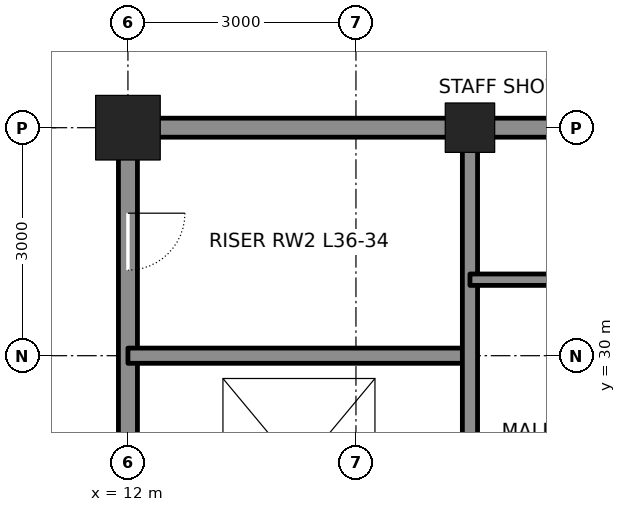
"""IFC4 building model, lengths in metres.
Left out: names, types, materials, properties, quantities, classifications, styles, units other than length and angle.
Written with IfcOpenShell. Run it as: python <this file> out.ifc"""

import sys

from ifc_helpers import new_model, si_unit, direction, frame, frame_2d, origin, origin_2d, place, context, subcontext, project, spatial, rectangle, hollow_rectangle, extrude, element, fill, save


model = new_model("IFC4")
c1 = context("Model", 3, precision=1e-05, world=origin(), true_north=direction((0.0, 1.0)))
c2 = subcontext(c1, "Body", "Model", "MODEL_VIEW")
j1 = project(units=[si_unit("LENGTHUNIT", "METRE"), si_unit("PLANEANGLEUNIT", "RADIAN")], contexts=[c1])
p1 = place(None, origin())
s1 = spatial("IfcSite", under=j1, at=p1, CompositionType="ELEMENT")
p2 = place(p1, origin())
s2 = spatial("IfcBuilding", under=s1, at=p2, CompositionType="ELEMENT")
p3 = place(p2, frame((0.0, 0.0, 165.6)))
s3 = spatial("IfcBuildingStorey", under=s2, at=p3, CompositionType="ELEMENT", Elevation=165.6)
p4 = place(p3, frame((12.0, 33.0, 0.0), z_axis=(0.0, 0.0, 1.0), x_axis=(1.0, 0.0, 0.0)))
e1 = element("IfcColumn", 1, at=p4, inside=s3, PredefinedType="COLUMN", context=c2, shape_type="SweptSolid", body=[
    extrude(hollow_rectangle(XDim=0.85, YDim=0.85, WallThickness=0.085, at=origin_2d()), origin(), (0.0, 0.0, 1.0), 4.2),
])
p5 = place(p3, frame((16.5, 33.0, 0.0), z_axis=(0.0, 0.0, 1.0), x_axis=(1.0, 0.0, 0.0)))
e2 = element("IfcColumn", 2, at=p5, inside=s3, PredefinedType="COLUMN", context=c2, shape_type="SweptSolid", body=[
    extrude(hollow_rectangle(XDim=0.65, YDim=0.65, WallThickness=0.065, at=origin_2d()), origin(), (0.0, 0.0, 1.0), 4.2),
])
p6 = place(p3, frame((12.0, 24.25, 0.0), z_axis=(0.0, 0.0, 1.0), x_axis=(0.0, 1.0, 0.0)))
e3 = element("IfcWall", 3, at=p6, inside=s3, PredefinedType="SOLIDWALL", context=c2, shape_type="SweptSolid", body=[
    extrude(rectangle(XDim=8.5, YDim=0.25, at=frame_2d((4.25, 0.0))), origin(), (0.0, 0.0, 1.0), 3.113),
])
p7 = place(p6, frame((0.65, 0.0, 0.0)))
e4 = element("IfcOpeningElement", 4, at=p7, cuts=e3, PredefinedType="OPENING", context=c2, shape_type="SweptSolid", body=[
    extrude(rectangle(XDim=1.2, YDim=2.1, at=frame_2d((0.6, 1.05))), frame((0.0, 0.135, 0.0), z_axis=(0.0, -1.0, 0.0), x_axis=(1.0, 0.0, 0.0)), (0.0, 0.0, 1.0), 0.27),
])
p8 = place(p6, frame((6.875, 0.0, 0.0)))
e5 = element("IfcOpeningElement", 5, at=p8, cuts=e3, PredefinedType="OPENING", context=c2, shape_type="SweptSolid", body=[
    extrude(rectangle(XDim=0.75, YDim=2.1, at=frame_2d((0.375, 1.05))), frame((0.0, 0.135, 0.0), z_axis=(0.0, -1.0, 0.0), x_axis=(1.0, 0.0, 0.0)), (0.0, 0.0, 1.0), 0.27),
])
p9 = place(p3, frame((12.0, 30.0, 0.0), z_axis=(0.0, 0.0, 1.0), x_axis=(1.0, 0.0, 0.0)))
e6 = element("IfcWall", 6, at=p9, inside=s3, PredefinedType="SOLIDWALL", context=c2, shape_type="SweptSolid", body=[
    extrude(rectangle(XDim=4.5, YDim=0.2, at=frame_2d((2.25, 0.0))), origin(), (0.0, 0.0, 1.0), 4.04),
])
p10 = place(p3, frame((12.25, 33.0, 0.0), z_axis=(0.0, 0.0, 1.0), x_axis=(1.0, 0.0, 0.0)))
e7 = element("IfcWall", 7, at=p10, inside=s3, PredefinedType="SOLIDWALL", context=c2, shape_type="SweptSolid", body=[
    extrude(rectangle(XDim=4.0, YDim=0.25, at=frame_2d((2.0, 0.0))), origin(), (0.0, 0.0, 1.0), 3.181),
])
p11 = place(p3, frame((16.75, 33.0, 0.0), z_axis=(0.0, 0.0, 1.0), x_axis=(1.0, 0.0, 0.0)))
e8 = element("IfcWall", 8, at=p11, inside=s3, PredefinedType="SOLIDWALL", context=c2, shape_type="SweptSolid", body=[
    extrude(rectangle(XDim=2.5, YDim=0.25, at=frame_2d((1.25, 0.0))), origin(), (0.0, 0.0, 1.0), 3.181),
])
p12 = place(p3, frame((16.5, 24.25, 0.0), z_axis=(0.0, 0.0, 1.0), x_axis=(0.0, 1.0, 0.0)))
e9 = element("IfcWall", 9, at=p12, inside=s3, PredefinedType="SOLIDWALL", context=c2, shape_type="SweptSolid", body=[
    extrude(rectangle(XDim=8.5, YDim=0.2, at=frame_2d((4.25, 0.0))), origin(), (0.0, 0.0, 1.0), 3.113),
])
p13 = place(p3, frame((16.5, 31.0, 0.0), z_axis=(0.0, 0.0, 1.0), x_axis=(1.0, 0.0, 0.0)))
e10 = element("IfcWall", 10, at=p13, inside=s3, PredefinedType="PARTITIONING", context=c2, shape_type="SweptSolid", body=[
    extrude(rectangle(XDim=3.0, YDim=0.15, at=frame_2d((1.5, 0.0))), origin(), (0.0, 0.0, 1.0), 4.04),
])
p14 = place(p8, frame((0.75, 0.0, 0.0), z_axis=(0.0, 0.0, 1.0), x_axis=(-1.0, 0.0, 0.0)))
e11 = element("IfcDoor", 11, at=p14, inside=s3, OperationType="SINGLE_SWING_LEFT", PredefinedType="DOOR", context=c2, shape_type="SweptSolid", body=[
    extrude(rectangle(XDim=0.75, YDim=2.1, at=frame_2d((0.375, 1.05))), frame((0.0, 0.025, 0.0), z_axis=(0.0, -1.0, 0.0), x_axis=(1.0, 0.0, 0.0)), (0.0, 0.0, 1.0), 0.05),
])
fill(e5, e11)
save(model, sys.argv[1])
